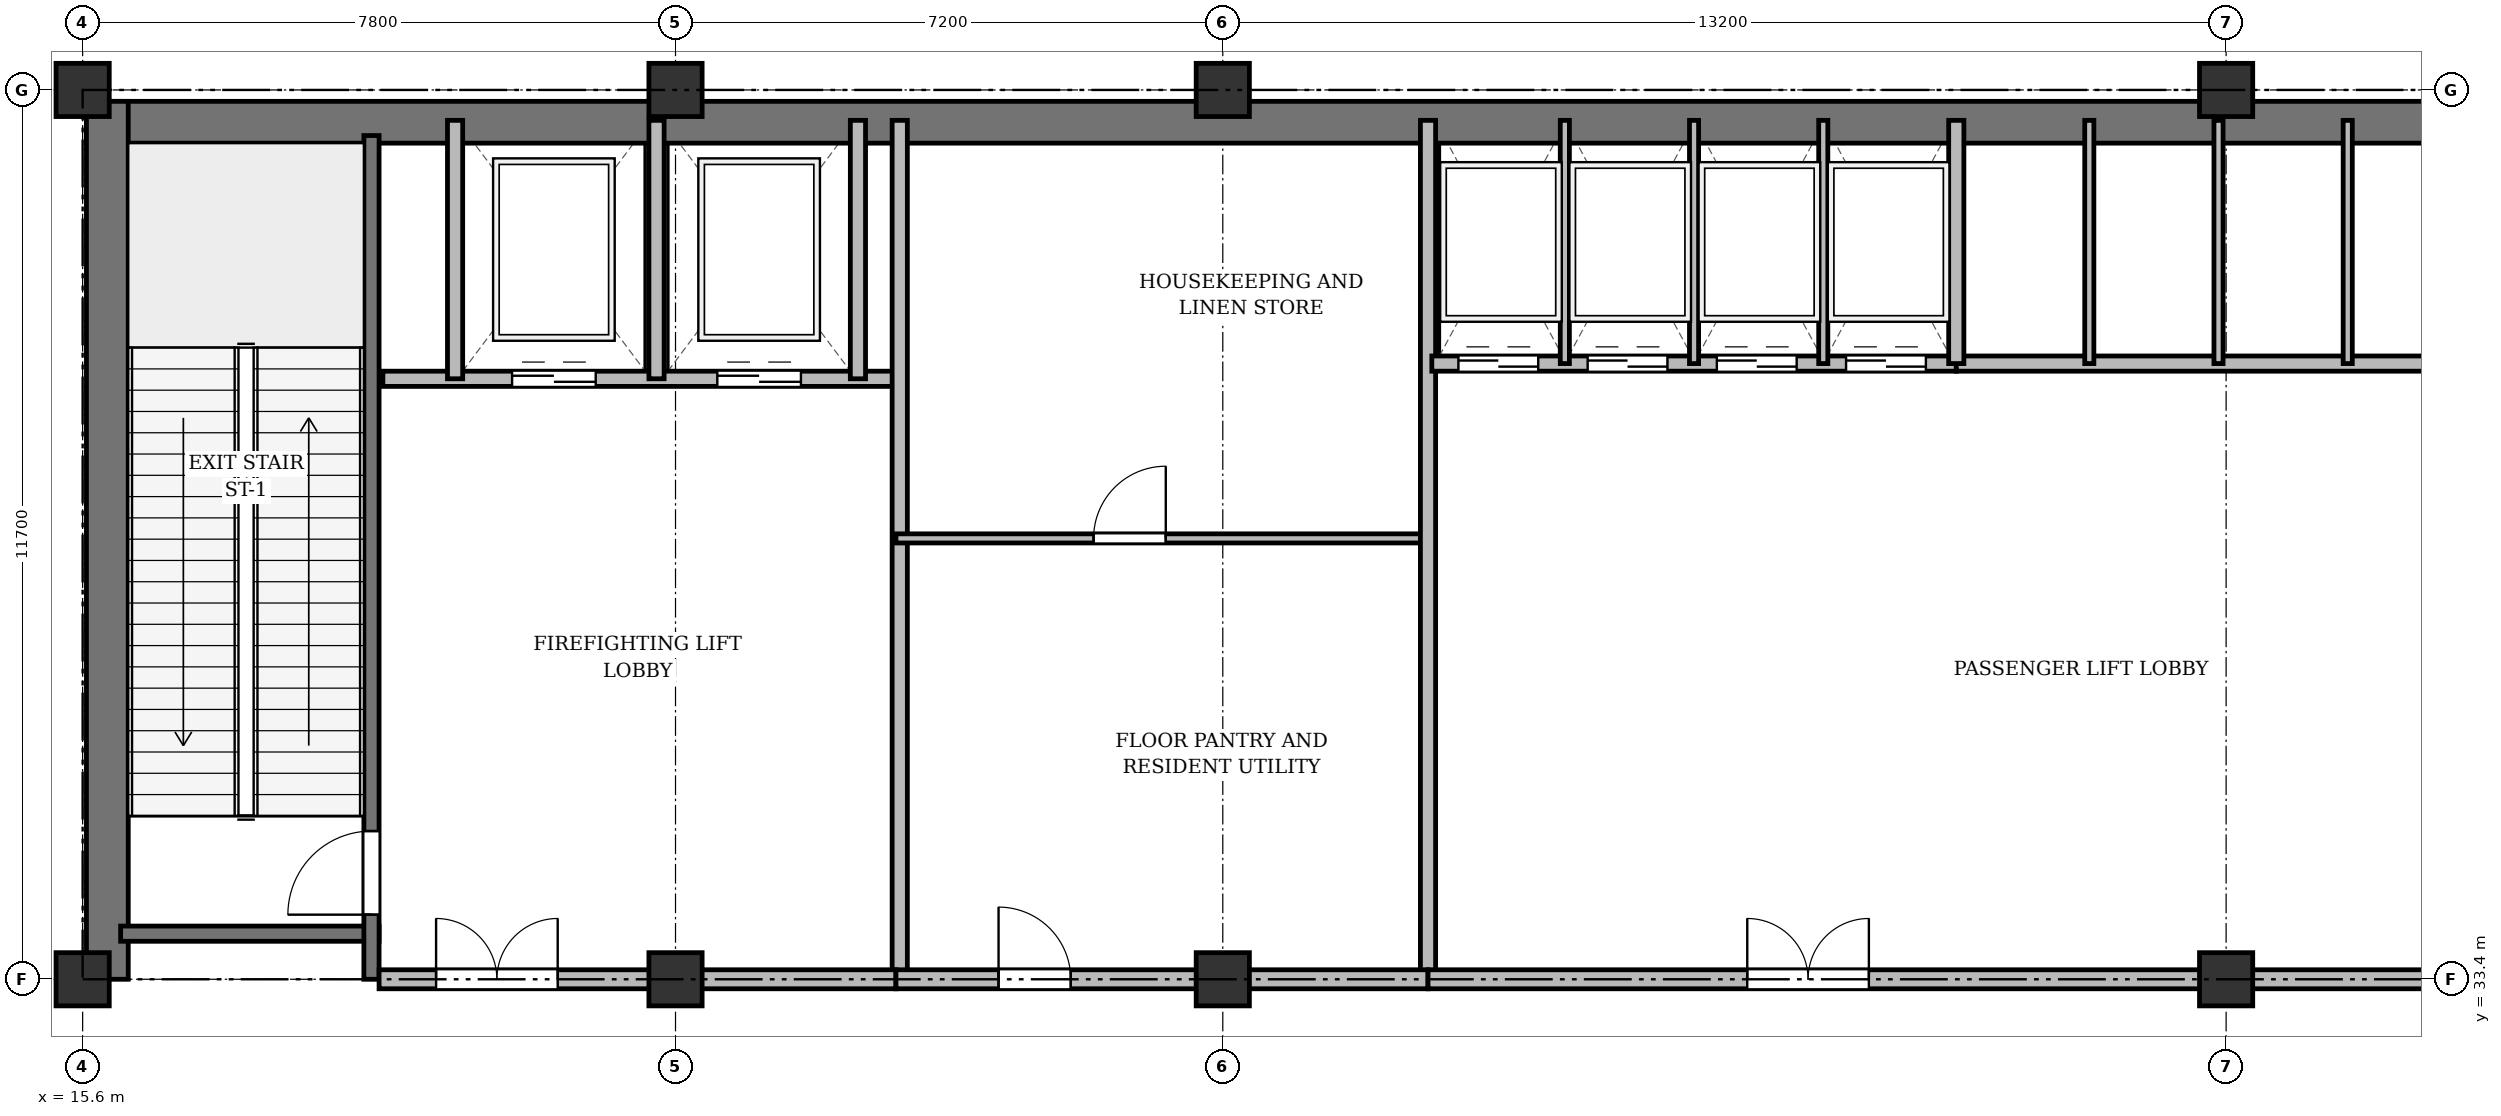
"""IFC4 building model, lengths in metres.
Left out: names, types, materials, properties, quantities, classifications, styles, units other than length and angle.
Written with IfcOpenShell. Run it as: python <this file> out.ifc"""

import sys

from ifc_helpers import new_model, si_unit, direction, frame, frame_2d, origin, origin_2d, place, context, subcontext, project, spatial, rectangle, extrude, source, transform, mapped, element, fill, save


model = new_model("IFC4")
c1 = context("Model", 3, precision=1e-05, world=origin(), true_north=direction((0.0, 1.0)))
c2 = subcontext(c1, "Body", "Model", "MODEL_VIEW")
j1 = project(units=[si_unit("LENGTHUNIT", "METRE"), si_unit("PLANEANGLEUNIT", "RADIAN")], contexts=[c1])
p1 = place(None, origin())
s1 = spatial("IfcSite", under=j1, at=p1, CompositionType="ELEMENT")
p2 = place(p1, origin())
s2 = spatial("IfcBuilding", under=s1, at=p2, CompositionType="ELEMENT")
p3 = place(p2, frame((0.0, 0.0, 182.5)))
s3 = spatial("IfcBuildingStorey", under=s2, at=p3, CompositionType="ELEMENT", Elevation=182.5)
m1 = source(origin(), c2, "Body", "SweptSolid", [
    extrude(rectangle(XDim=0.7, YDim=0.7, at=origin_2d()), origin(), (0.0, 0.0, 1.0), 8.0),
])
for number, where, z_axis, x_axis in (
    (1, (15.6, 33.4, 0.0), (0.0, 0.0, 1.0), (1.0, 0.0, 0.0)),
    (2, (15.6, 45.1, 0.0), (0.0, 0.0, 1.0), (1.0, 0.0, 0.0)),
    (3, (23.4, 33.4, 0.0), (0.0, 0.0, 1.0), (1.0, 0.0, 0.0)),
    (4, (23.4, 45.1, 0.0), (0.0, 0.0, 1.0), (1.0, 0.0, 0.0)),
    (5, (30.6, 33.4, 0.0), (0.0, 0.0, 1.0), (1.0, 0.0, 0.0)),
    (6, (30.6, 45.1, 0.0), (0.0, 0.0, 1.0), (1.0, 0.0, 0.0)),
    (7, (43.8, 33.4, 0.0), (0.0, 0.0, 1.0), (1.0, 0.0, 0.0)),
    (8, (43.8, 45.1, 0.0), (0.0, 0.0, 1.0), (1.0, 0.0, 0.0)),
):
    element("IfcColumn", number, at=place(p3, frame(where, z_axis=z_axis, x_axis=x_axis)), inside=s3, PredefinedType="COLUMN", context=c2, shape_type="MappedRepresentation", body=[
        mapped(m1, transform((0.0, 0.0, 0.0), x_axis=(1.0, 0.0, 0.0), y_axis=(0.0, 1.0, 0.0), z_axis=(0.0, 0.0, 1.0), scale=1.0)),
    ])
p4 = place(p3, frame((15.65, 44.675, 0.0), z_axis=(0.0, 0.0, 1.0), x_axis=(1.0, 0.0, 0.0)))
e9 = element("IfcWall", 9, at=p4, inside=s3, PredefinedType="SHEAR", context=c2, shape_type="SweptSolid", body=[
    extrude(rectangle(XDim=43.1, YDim=0.55, at=frame_2d((21.55, 0.0))), origin(), (0.0, 0.0, 1.0), 7.62),
])
p5 = place(p3, frame((15.925, 33.4, 0.0), z_axis=(0.0, 0.0, 1.0), x_axis=(0.0, 1.0, 0.0)))
e10 = element("IfcWall", 10, at=p5, inside=s3, PredefinedType="SHEAR", context=c2, shape_type="SweptSolid", body=[
    extrude(rectangle(XDim=11.55, YDim=0.55, at=frame_2d((5.775, 0.0))), origin(), (0.0, 0.0, 1.0), 7.62),
])
p6 = place(p3, frame((16.1, 34.0, 0.0), z_axis=(0.0, 0.0, 1.0), x_axis=(1.0, 0.0, 0.0)))
e11 = element("IfcWall", 11, at=p6, inside=s3, PredefinedType="SHEAR", context=c2, shape_type="SweptSolid", body=[
    extrude(rectangle(XDim=3.4, YDim=0.2, at=frame_2d((1.7, 0.0))), origin(), (0.0, 0.0, 1.0), 7.62),
])
p7 = place(p3, frame((19.4, 33.4, 0.0), z_axis=(0.0, 0.0, 1.0), x_axis=(0.0, 1.0, 0.0)))
e12 = element("IfcWall", 12, at=p7, inside=s3, PredefinedType="SHEAR", context=c2, shape_type="SweptSolid", body=[
    extrude(rectangle(XDim=11.1, YDim=0.2, at=frame_2d((5.55, 0.0))), origin(), (0.0, 0.0, 1.0), 7.62),
])
p8 = place(p7, frame((0.85, 0.0, 0.0)))
e13 = element("IfcOpeningElement", 13, at=p8, cuts=e12, PredefinedType="OPENING", context=c2, shape_type="SweptSolid", body=[
    extrude(rectangle(XDim=1.1, YDim=2.15, at=frame_2d((0.55, 1.075))), frame((0.0, 0.11, 0.0), z_axis=(0.0, -1.0, 0.0), x_axis=(1.0, 0.0, 0.0)), (0.0, 0.0, 1.0), 0.22),
])
p9 = place(p3, frame((19.55, 41.3, 0.0), z_axis=(0.0, 0.0, 1.0), x_axis=(1.0, 0.0, 0.0)))
e14 = element("IfcWall", 14, at=p9, inside=s3, PredefinedType="SOLIDWALL", context=c2, shape_type="SweptSolid", body=[
    extrude(rectangle(XDim=6.75, YDim=0.2, at=frame_2d((3.375, 0.0))), origin(), (0.0, 0.0, 1.0), 7.62),
])
p10 = place(p9, frame((1.7, 0.0, 0.0)))
e15 = element("IfcOpeningElement", 15, at=p10, cuts=e14, PredefinedType="OPENING", context=c2, shape_type="SweptSolid", body=[
    extrude(rectangle(XDim=1.1, YDim=2.15, at=frame_2d((0.55, 1.075))), frame((0.0, 0.11, 0.0), z_axis=(0.0, -1.0, 0.0), x_axis=(1.0, 0.0, 0.0)), (0.0, 0.0, 1.0), 0.22),
])
p11 = place(p9, frame((4.4, 0.0, 0.0)))
e16 = element("IfcOpeningElement", 16, at=p11, cuts=e14, PredefinedType="OPENING", context=c2, shape_type="SweptSolid", body=[
    extrude(rectangle(XDim=1.1, YDim=2.15, at=frame_2d((0.55, 1.075))), frame((0.0, 0.11, 0.0), z_axis=(0.0, -1.0, 0.0), x_axis=(1.0, 0.0, 0.0)), (0.0, 0.0, 1.0), 0.22),
])
for number, where, z_axis, x_axis in (
    (17, (20.5, 41.3, 0.0), (0.0, 0.0, 1.0), (0.0, 1.0, 0.0)),
    (18, (23.15, 41.3, 0.0), (0.0, 0.0, 1.0), (0.0, 1.0, 0.0)),
    (19, (25.8, 41.3, 0.0), (0.0, 0.0, 1.0), (0.0, 1.0, 0.0)),
):
    element("IfcWall", number, at=place(p3, frame(where, z_axis=z_axis, x_axis=x_axis)), inside=s3, PredefinedType="SOLIDWALL", context=c2, shape_type="SweptSolid", body=[
        extrude(rectangle(XDim=3.4, YDim=0.2, at=frame_2d((1.7, 0.0))), origin(), (0.0, 0.0, 1.0), 7.62),
    ])
p12 = place(p3, frame((26.35, 33.4, 0.0), z_axis=(0.0, 0.0, 1.0), x_axis=(0.0, 1.0, 0.0)))
e20 = element("IfcWall", 20, at=p12, inside=s3, PredefinedType="SOLIDWALL", context=c2, shape_type="SweptSolid", body=[
    extrude(rectangle(XDim=11.3, YDim=0.2, at=frame_2d((5.65, 0.0))), origin(), (0.0, 0.0, 1.0), 7.02),
])
p13 = place(p3, frame((19.5, 33.4, 0.0), z_axis=(0.0, 0.0, 1.0), x_axis=(1.0, 0.0, 0.0)))
e21 = element("IfcWall", 21, at=p13, inside=s3, PredefinedType="PARTITIONING", context=c2, shape_type="SweptSolid", body=[
    extrude(rectangle(XDim=6.8, YDim=0.25, at=frame_2d((3.4, 0.0))), origin(), (0.0, 0.0, 1.0), 7.02),
])
p14 = place(p13, frame((0.75, 0.0, 0.0)))
e22 = element("IfcOpeningElement", 22, at=p14, cuts=e21, PredefinedType="OPENING", context=c2, shape_type="SweptSolid", body=[
    extrude(rectangle(XDim=1.6, YDim=2.2, at=frame_2d((0.8, 1.1))), frame((0.0, 0.135, 0.0), z_axis=(0.0, -1.0, 0.0), x_axis=(1.0, 0.0, 0.0)), (0.0, 0.0, 1.0), 0.27),
])
p15 = place(p3, frame((26.3, 39.2, 0.0), z_axis=(0.0, 0.0, 1.0), x_axis=(1.0, 0.0, 0.0)))
e23 = element("IfcWall", 23, at=p15, inside=s3, PredefinedType="PARTITIONING", context=c2, shape_type="SweptSolid", body=[
    extrude(rectangle(XDim=7.0, YDim=0.12, at=frame_2d((3.5, 0.0))), origin(), (0.0, 0.0, 1.0), 7.12),
])
p16 = place(p15, frame((2.6, 0.0, 0.0)))
e24 = element("IfcOpeningElement", 24, at=p16, cuts=e23, PredefinedType="OPENING", context=c2, shape_type="SweptSolid", body=[
    extrude(rectangle(XDim=0.95, YDim=2.15, at=frame_2d((0.475, 1.075))), frame((0.0, 0.07, 0.0), z_axis=(0.0, -1.0, 0.0), x_axis=(1.0, 0.0, 0.0)), (0.0, 0.0, 1.0), 0.14),
])
p17 = place(p3, frame((33.3, 33.4, 0.0), z_axis=(0.0, 0.0, 1.0), x_axis=(0.0, 1.0, 0.0)))
e25 = element("IfcWall", 25, at=p17, inside=s3, PredefinedType="SOLIDWALL", context=c2, shape_type="SweptSolid", body=[
    extrude(rectangle(XDim=11.3, YDim=0.2, at=frame_2d((5.65, 0.0))), origin(), (0.0, 0.0, 1.0), 7.02),
])
p18 = place(p3, frame((33.35, 41.5, 0.0), z_axis=(0.0, 0.0, 1.0), x_axis=(1.0, 0.0, 0.0)))
e26 = element("IfcWall", 26, at=p18, inside=s3, PredefinedType="SOLIDWALL", context=c2, shape_type="SweptSolid", body=[
    extrude(rectangle(XDim=6.9, YDim=0.2, at=frame_2d((3.45, 0.0))), origin(), (0.0, 0.0, 1.0), 7.62),
])
p19 = place(p18, frame((0.35, 0.0, 0.0)))
e27 = element("IfcOpeningElement", 27, at=p19, cuts=e26, PredefinedType="OPENING", context=c2, shape_type="SweptSolid", body=[
    extrude(rectangle(XDim=1.05, YDim=2.15, at=frame_2d((0.525, 1.075))), frame((0.0, 0.11, 0.0), z_axis=(0.0, -1.0, 0.0), x_axis=(1.0, 0.0, 0.0)), (0.0, 0.0, 1.0), 0.22),
])
p20 = place(p18, frame((2.05, 0.0, 0.0)))
e28 = element("IfcOpeningElement", 28, at=p20, cuts=e26, PredefinedType="OPENING", context=c2, shape_type="SweptSolid", body=[
    extrude(rectangle(XDim=1.05, YDim=2.15, at=frame_2d((0.525, 1.075))), frame((0.0, 0.11, 0.0), z_axis=(0.0, -1.0, 0.0), x_axis=(1.0, 0.0, 0.0)), (0.0, 0.0, 1.0), 0.22),
])
p21 = place(p18, frame((3.75, 0.0, 0.0)))
e29 = element("IfcOpeningElement", 29, at=p21, cuts=e26, PredefinedType="OPENING", context=c2, shape_type="SweptSolid", body=[
    extrude(rectangle(XDim=1.05, YDim=2.15, at=frame_2d((0.525, 1.075))), frame((0.0, 0.11, 0.0), z_axis=(0.0, -1.0, 0.0), x_axis=(1.0, 0.0, 0.0)), (0.0, 0.0, 1.0), 0.22),
])
p22 = place(p18, frame((5.45, 0.0, 0.0)))
e30 = element("IfcOpeningElement", 30, at=p22, cuts=e26, PredefinedType="OPENING", context=c2, shape_type="SweptSolid", body=[
    extrude(rectangle(XDim=1.05, YDim=2.15, at=frame_2d((0.525, 1.075))), frame((0.0, 0.11, 0.0), z_axis=(0.0, -1.0, 0.0), x_axis=(1.0, 0.0, 0.0)), (0.0, 0.0, 1.0), 0.22),
])
for number, where, z_axis, x_axis in (
    (31, (35.1, 41.5, 0.0), (0.0, 0.0, 1.0), (0.0, 1.0, 0.0)),
    (32, (36.8, 41.5, 0.0), (0.0, 0.0, 1.0), (0.0, 1.0, 0.0)),
    (33, (38.5, 41.5, 0.0), (0.0, 0.0, 1.0), (0.0, 1.0, 0.0)),
):
    element("IfcWall", number, at=place(p3, frame(where, z_axis=z_axis, x_axis=x_axis)), inside=s3, PredefinedType="PARTITIONING", context=c2, shape_type="SweptSolid", body=[
        extrude(rectangle(XDim=3.2, YDim=0.12, at=frame_2d((1.6, 0.0))), origin(), (0.0, 0.0, 1.0), 7.62),
    ])
p23 = place(p3, frame((40.25, 41.5, 0.0), z_axis=(0.0, 0.0, 1.0), x_axis=(1.0, 0.0, 0.0)))
e34 = element("IfcWall", 34, at=p23, inside=s3, PredefinedType="SOLIDWALL", context=c2, shape_type="SweptSolid", body=[
    extrude(rectangle(XDim=6.9, YDim=0.2, at=frame_2d((3.45, 0.0))), origin(), (0.0, 0.0, 1.0), 7.12),
])
p24 = place(p3, frame((40.25, 41.5, 0.0), z_axis=(0.0, 0.0, 1.0), x_axis=(0.0, 1.0, 0.0)))
e35 = element("IfcWall", 35, at=p24, inside=s3, PredefinedType="SOLIDWALL", context=c2, shape_type="SweptSolid", body=[
    extrude(rectangle(XDim=3.2, YDim=0.2, at=frame_2d((1.6, 0.0))), origin(), (0.0, 0.0, 1.0), 7.62),
])
p25 = place(p3, frame((42.0, 41.5, 0.0), z_axis=(0.0, 0.0, 1.0), x_axis=(0.0, 1.0, 0.0)))
e36 = element("IfcWall", 36, at=p25, inside=s3, PredefinedType="PARTITIONING", context=c2, shape_type="SweptSolid", body=[
    extrude(rectangle(XDim=3.2, YDim=0.12, at=frame_2d((1.6, 0.0))), origin(), (0.0, 0.0, 1.0), 7.62),
])
p26 = place(p3, frame((43.7, 41.5, 0.0), z_axis=(0.0, 0.0, 1.0), x_axis=(0.0, 1.0, 0.0)))
e37 = element("IfcWall", 37, at=p26, inside=s3, PredefinedType="PARTITIONING", context=c2, shape_type="SweptSolid", body=[
    extrude(rectangle(XDim=3.2, YDim=0.12, at=frame_2d((1.6, 0.0))), origin(), (0.0, 0.0, 1.0), 7.12),
])
p27 = place(p3, frame((45.4, 41.5, 0.0), z_axis=(0.0, 0.0, 1.0), x_axis=(0.0, 1.0, 0.0)))
e38 = element("IfcWall", 38, at=p27, inside=s3, PredefinedType="PARTITIONING", context=c2, shape_type="SweptSolid", body=[
    extrude(rectangle(XDim=3.2, YDim=0.12, at=frame_2d((1.6, 0.0))), origin(), (0.0, 0.0, 1.0), 7.62),
])
p28 = place(p3, frame((26.3, 33.4, 0.0), z_axis=(0.0, 0.0, 1.0), x_axis=(1.0, 0.0, 0.0)))
e39 = element("IfcWall", 39, at=p28, inside=s3, PredefinedType="PARTITIONING", context=c2, shape_type="SweptSolid", body=[
    extrude(rectangle(XDim=7.0, YDim=0.25, at=frame_2d((3.5, 0.0))), origin(), (0.0, 0.0, 1.0), 7.02),
])
p29 = place(p28, frame((1.35, 0.0, 0.0)))
e40 = element("IfcOpeningElement", 40, at=p29, cuts=e39, PredefinedType="OPENING", context=c2, shape_type="SweptSolid", body=[
    extrude(rectangle(XDim=0.95, YDim=2.15, at=frame_2d((0.475, 1.075))), frame((0.0, 0.135, 0.0), z_axis=(0.0, -1.0, 0.0), x_axis=(1.0, 0.0, 0.0)), (0.0, 0.0, 1.0), 0.27),
])
p30 = place(p3, frame((33.3, 33.4, 0.0), z_axis=(0.0, 0.0, 1.0), x_axis=(1.0, 0.0, 0.0)))
e41 = element("IfcWall", 41, at=p30, inside=s3, PredefinedType="PARTITIONING", context=c2, shape_type="SweptSolid", body=[
    extrude(rectangle(XDim=13.85, YDim=0.25, at=frame_2d((6.925, 0.0))), origin(), (0.0, 0.0, 1.0), 7.02),
])
p31 = place(p30, frame((4.2, 0.0, 0.0)))
e42 = element("IfcOpeningElement", 42, at=p31, cuts=e41, PredefinedType="OPENING", context=c2, shape_type="SweptSolid", body=[
    extrude(rectangle(XDim=1.6, YDim=2.2, at=frame_2d((0.8, 1.1))), frame((0.0, 0.135, 0.0), z_axis=(0.0, -1.0, 0.0), x_axis=(1.0, 0.0, 0.0)), (0.0, 0.0, 1.0), 0.27),
])
m2 = source(origin(), c2, "Body", "SweptSolid", [
    extrude(rectangle(XDim=1.1, YDim=2.15, at=frame_2d((0.55, 1.075))), frame((0.0, 0.025, 0.0), z_axis=(0.0, -1.0, 0.0), x_axis=(1.0, 0.0, 0.0)), (0.0, 0.0, 1.0), 0.05),
])
p32 = place(p8, origin())
e43 = element("IfcDoor", 43, at=p32, inside=s3, OperationType="SINGLE_SWING_LEFT", PredefinedType="DOOR", context=c2, shape_type="MappedRepresentation", body=[
    mapped(m2, transform((0.0, 0.0, 0.0), x_axis=(1.0, 0.0, 0.0), y_axis=(0.0, 1.0, 0.0), z_axis=(0.0, 0.0, 1.0), scale=1.0)),
])
fill(e13, e43)
p33 = place(p10, origin())
e44 = element("IfcDoor", 44, at=p33, inside=s3, OperationType="DOUBLE_DOOR_SLIDING", PredefinedType="DOOR", context=c2, shape_type="MappedRepresentation", body=[
    mapped(m2, transform((0.0, 0.0, 0.0), x_axis=(1.0, 0.0, 0.0), y_axis=(0.0, 1.0, 0.0), z_axis=(0.0, 0.0, 1.0), scale=1.0)),
])
fill(e15, e44)
p34 = place(p11, origin())
e45 = element("IfcDoor", 45, at=p34, inside=s3, OperationType="DOUBLE_DOOR_SLIDING", PredefinedType="DOOR", context=c2, shape_type="MappedRepresentation", body=[
    mapped(m2, transform((0.0, 0.0, 0.0), x_axis=(1.0, 0.0, 0.0), y_axis=(0.0, 1.0, 0.0), z_axis=(0.0, 0.0, 1.0), scale=1.0)),
])
fill(e16, e45)
m3 = source(origin(), c2, "Body", "SweptSolid", [
    extrude(rectangle(XDim=1.6, YDim=2.2, at=frame_2d((0.8, 1.1))), frame((0.0, 0.025, 0.0), z_axis=(0.0, -1.0, 0.0), x_axis=(1.0, 0.0, 0.0)), (0.0, 0.0, 1.0), 0.05),
])
p35 = place(p14, origin())
e46 = element("IfcDoor", 46, at=p35, inside=s3, OperationType="DOUBLE_DOOR_SINGLE_SWING", PredefinedType="DOOR", context=c2, shape_type="MappedRepresentation", body=[
    mapped(m3, transform((0.0, 0.0, 0.0), x_axis=(1.0, 0.0, 0.0), y_axis=(0.0, 1.0, 0.0), z_axis=(0.0, 0.0, 1.0), scale=1.0)),
])
fill(e22, e46)
m4 = source(origin(), c2, "Body", "SweptSolid", [
    extrude(rectangle(XDim=0.95, YDim=2.15, at=frame_2d((0.475, 1.075))), frame((0.0, 0.025, 0.0), z_axis=(0.0, -1.0, 0.0), x_axis=(1.0, 0.0, 0.0)), (0.0, 0.0, 1.0), 0.05),
])
p36 = place(p16, origin())
e47 = element("IfcDoor", 47, at=p36, inside=s3, OperationType="SINGLE_SWING_RIGHT", PredefinedType="DOOR", context=c2, shape_type="MappedRepresentation", body=[
    mapped(m4, transform((0.0, 0.0, 0.0), x_axis=(1.0, 0.0, 0.0), y_axis=(0.0, 1.0, 0.0), z_axis=(0.0, 0.0, 1.0), scale=1.0)),
])
fill(e24, e47)
m5 = source(origin(), c2, "Body", "SweptSolid", [
    extrude(rectangle(XDim=1.05, YDim=2.15, at=frame_2d((0.525, 1.075))), frame((0.0, 0.025, 0.0), z_axis=(0.0, -1.0, 0.0), x_axis=(1.0, 0.0, 0.0)), (0.0, 0.0, 1.0), 0.05),
])
p37 = place(p19, origin())
e48 = element("IfcDoor", 48, at=p37, inside=s3, OperationType="DOUBLE_DOOR_SLIDING", PredefinedType="DOOR", context=c2, shape_type="MappedRepresentation", body=[
    mapped(m5, transform((0.0, 0.0, 0.0), x_axis=(1.0, 0.0, 0.0), y_axis=(0.0, 1.0, 0.0), z_axis=(0.0, 0.0, 1.0), scale=1.0)),
])
fill(e27, e48)
p38 = place(p20, origin())
e49 = element("IfcDoor", 49, at=p38, inside=s3, OperationType="DOUBLE_DOOR_SLIDING", PredefinedType="DOOR", context=c2, shape_type="MappedRepresentation", body=[
    mapped(m5, transform((0.0, 0.0, 0.0), x_axis=(1.0, 0.0, 0.0), y_axis=(0.0, 1.0, 0.0), z_axis=(0.0, 0.0, 1.0), scale=1.0)),
])
fill(e28, e49)
p39 = place(p21, origin())
e50 = element("IfcDoor", 50, at=p39, inside=s3, OperationType="DOUBLE_DOOR_SLIDING", PredefinedType="DOOR", context=c2, shape_type="MappedRepresentation", body=[
    mapped(m5, transform((0.0, 0.0, 0.0), x_axis=(1.0, 0.0, 0.0), y_axis=(0.0, 1.0, 0.0), z_axis=(0.0, 0.0, 1.0), scale=1.0)),
])
fill(e29, e50)
p40 = place(p22, origin())
e51 = element("IfcDoor", 51, at=p40, inside=s3, OperationType="DOUBLE_DOOR_SLIDING", PredefinedType="DOOR", context=c2, shape_type="MappedRepresentation", body=[
    mapped(m5, transform((0.0, 0.0, 0.0), x_axis=(1.0, 0.0, 0.0), y_axis=(0.0, 1.0, 0.0), z_axis=(0.0, 0.0, 1.0), scale=1.0)),
])
fill(e30, e51)
p41 = place(p29, origin())
e52 = element("IfcDoor", 52, at=p41, inside=s3, OperationType="SINGLE_SWING_LEFT", PredefinedType="DOOR", context=c2, shape_type="MappedRepresentation", body=[
    mapped(m4, transform((0.0, 0.0, 0.0), x_axis=(1.0, 0.0, 0.0), y_axis=(0.0, 1.0, 0.0), z_axis=(0.0, 0.0, 1.0), scale=1.0)),
])
fill(e40, e52)
p42 = place(p31, origin())
e53 = element("IfcDoor", 53, at=p42, inside=s3, OperationType="DOUBLE_DOOR_SINGLE_SWING", PredefinedType="DOOR", context=c2, shape_type="MappedRepresentation", body=[
    mapped(m3, transform((0.0, 0.0, 0.0), x_axis=(1.0, 0.0, 0.0), y_axis=(0.0, 1.0, 0.0), z_axis=(0.0, 0.0, 1.0), scale=1.0)),
])
fill(e42, e53)
save(model, sys.argv[1])
